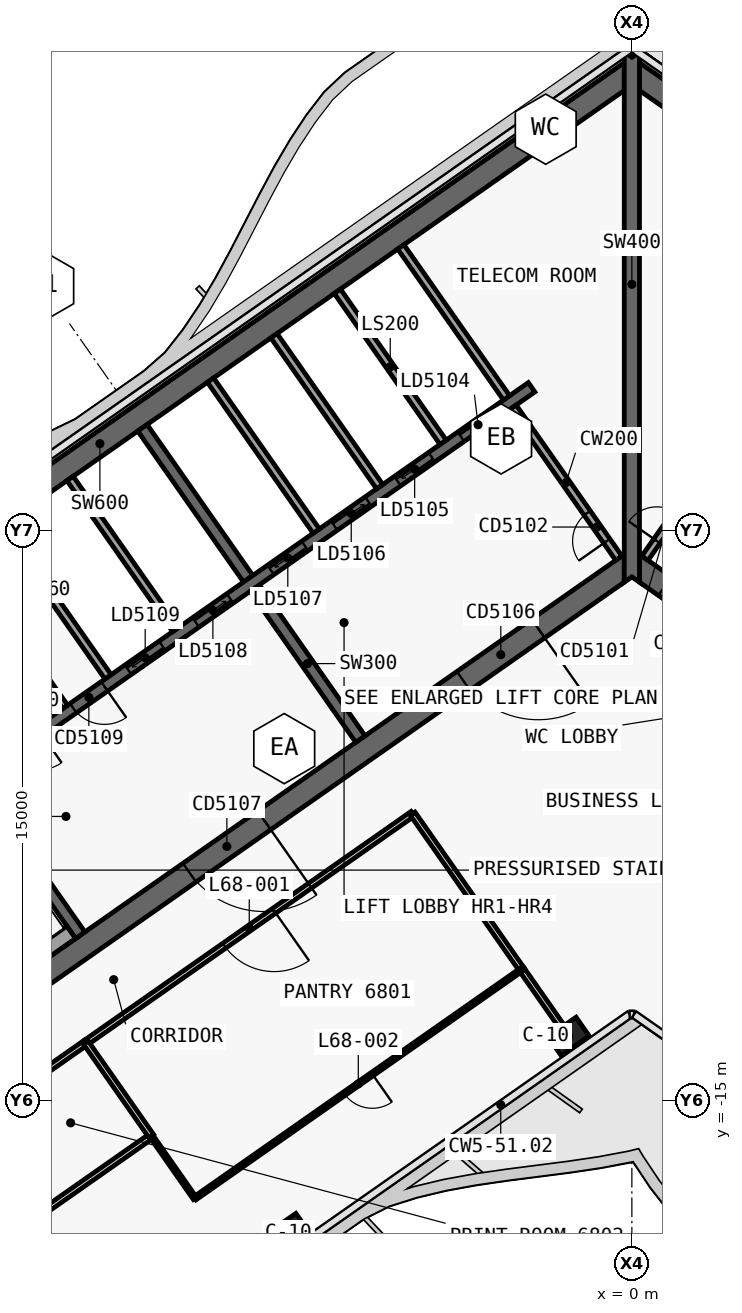
"""IFC4 building model, lengths in metres.
Left out: names, types, materials, properties, quantities, classifications, styles, units other than length and angle.
Written with IfcOpenShell. Run it as: python <this file> out.ifc"""

import sys

from ifc_helpers import new_model, si_unit, direction, frame, frame_2d, origin, origin_2d, place, context, subcontext, project, spatial, polyline, rectangle, outline, extrude, element, fill, save


model = new_model("IFC4")
c1 = context("Model", 3, precision=1e-05, world=origin(), true_north=direction((0.0, 1.0)))
c2 = subcontext(c1, "Body", "Model", "MODEL_VIEW")
j1 = project(units=[si_unit("LENGTHUNIT", "METRE"), si_unit("PLANEANGLEUNIT", "RADIAN")], contexts=[c1])
p1 = place(None, origin())
s1 = spatial("IfcSite", under=j1, at=p1, CompositionType="ELEMENT")
p2 = place(p1, origin())
s2 = spatial("IfcBuilding", under=s1, at=p2, CompositionType="ELEMENT")
p3 = place(p2, frame((0.0, 0.0, 287.8)))
s3 = spatial("IfcBuildingStorey", under=s2, at=p3, CompositionType="ELEMENT", Elevation=287.8)
p4 = place(p3, frame((-0.028, 12.066, 0.0), z_axis=(0.0, 0.0, 1.0), x_axis=(-0.819151382952, -0.573577380837, 0.0)))
e1 = element("IfcWall", 1, at=p4, inside=s3, PredefinedType="SHEAR", context=c2, shape_type="SweptSolid", body=[
    extrude(outline(polyline([(33.898, 0.3), (0.42, 0.3), (0.0, -0.3), (33.898, -0.3), (33.898, 0.3)])), origin(), (0.0, 0.0, 1.0), 3.9),
])
p5 = place(p3, frame((-0.028, -0.874, 0.0), z_axis=(0.0, 0.0, 1.0), x_axis=(-0.819150035022, -0.573579305871, 0.0)))
e2 = element("IfcWall", 2, at=p5, inside=s3, PredefinedType="SHEAR", context=c2, shape_type="SweptSolid", body=[
    extrude(outline(polyline([(26.476, 0.3), (0.42, 0.3), (0.0, -0.3), (26.476, -0.3), (26.476, 0.3)])), origin(), (0.0, 0.0, 1.0), 3.9),
])
p6 = place(p5, frame((2.976, 0.0, 0.0)))
e3 = element("IfcOpeningElement", 3, at=p6, cuts=e2, PredefinedType="OPENING", context=c2, shape_type="SweptSolid", body=[
    extrude(rectangle(XDim=2.4, YDim=2.1, at=frame_2d((1.2, 1.05))), frame((0.0, 0.31, 0.0), z_axis=(0.0, -1.0, 0.0), x_axis=(1.0, 0.0, 0.0)), (0.0, 0.0, 1.0), 0.62),
])
p7 = place(p5, frame((11.776, 0.0, 0.0)))
e4 = element("IfcOpeningElement", 4, at=p7, cuts=e2, PredefinedType="OPENING", context=c2, shape_type="SweptSolid", body=[
    extrude(rectangle(XDim=2.4, YDim=2.1, at=frame_2d((1.2, 1.05))), frame((0.0, 0.31, 0.0), z_axis=(0.0, -1.0, 0.0), x_axis=(1.0, 0.0, 0.0)), (0.0, 0.0, 1.0), 0.62),
])
p8 = place(p3, frame((-7.143, -5.49, 0.0), z_axis=(0.0, 0.0, 1.0), x_axis=(-0.573617744349, 0.819123118565, 0.0)))
e5 = element("IfcWall", 5, at=p8, inside=s3, PredefinedType="SHEAR", context=c2, shape_type="SweptSolid", body=[
    extrude(outline(polyline([(4.85, 0.15), (0.0, 0.15), (0.0, -0.15), (4.85, -0.15), (4.85, 0.15)])), origin(), (0.0, 0.0, 1.0), 3.9),
])
p9 = place(p3, frame((-10.097, -1.271, 0.0), z_axis=(0.0, 0.0, 1.0), x_axis=(-0.573560315113, 0.819163332265, 0.0)))
e6 = element("IfcWall", 6, at=p9, inside=s3, PredefinedType="SHEAR", context=c2, shape_type="SweptSolid", body=[
    extrude(outline(polyline([(4.85, -0.15), (4.85, 0.15), (0.0, 0.15), (0.0, -0.15), (4.85, -0.15)])), origin(), (0.0, 0.0, 1.0), 3.9),
])
p10 = place(p3, frame((-14.515, -10.652, 0.0), z_axis=(0.0, 0.0, 1.0), x_axis=(-0.573560315113, 0.819163332265, 0.0)))
e7 = element("IfcWall", 7, at=p10, inside=s3, PredefinedType="SHEAR", context=c2, shape_type="SweptSolid", body=[
    extrude(outline(polyline([(4.85, 0.15), (0.0, 0.15), (0.0, -0.15), (4.85, -0.15), (4.85, 0.15)])), origin(), (0.0, 0.0, 1.0), 3.9),
])
p11 = place(p3, frame((-2.638, 3.768, 0.0), z_axis=(0.0, 0.0, 1.0), x_axis=(-0.819155014212, -0.573572194837, 0.0)))
e8 = element("IfcWall", 8, at=p11, inside=s3, PredefinedType="SHEAR", context=c2, shape_type="SweptSolid", body=[
    extrude(outline(polyline([(26.4, 0.15), (0.0, 0.15), (0.0, -0.15), (26.4, -0.15), (26.4, 0.15)])), origin(), (0.0, 0.0, 1.0), 3.9),
])
p12 = place(p11, frame((1.169, 0.0, 0.0)))
e9 = element("IfcOpeningElement", 9, at=p12, cuts=e8, PredefinedType="OPENING", context=c2, shape_type="SweptSolid", body=[
    extrude(rectangle(XDim=1.1, YDim=2.1, at=frame_2d((0.55, 1.05))), frame((0.0, 0.16, 0.0), z_axis=(0.0, -1.0, 0.0), x_axis=(1.0, 0.0, 0.0)), (0.0, 0.0, 1.0), 0.32),
])
p13 = place(p11, frame((3.206, 0.0, 0.0)))
e10 = element("IfcOpeningElement", 10, at=p13, cuts=e8, PredefinedType="OPENING", context=c2, shape_type="SweptSolid", body=[
    extrude(rectangle(XDim=1.1, YDim=2.1, at=frame_2d((0.55, 1.05))), frame((0.0, 0.16, 0.0), z_axis=(0.0, -1.0, 0.0), x_axis=(1.0, 0.0, 0.0)), (0.0, 0.0, 1.0), 0.32),
])
p14 = place(p11, frame((5.244, 0.0, 0.0)))
e11 = element("IfcOpeningElement", 11, at=p14, cuts=e8, PredefinedType="OPENING", context=c2, shape_type="SweptSolid", body=[
    extrude(rectangle(XDim=1.1, YDim=2.1, at=frame_2d((0.55, 1.05))), frame((0.0, 0.16, 0.0), z_axis=(0.0, -1.0, 0.0), x_axis=(1.0, 0.0, 0.0)), (0.0, 0.0, 1.0), 0.32),
])
p15 = place(p11, frame((7.281, 0.0, 0.0)))
e12 = element("IfcOpeningElement", 12, at=p15, cuts=e8, PredefinedType="OPENING", context=c2, shape_type="SweptSolid", body=[
    extrude(rectangle(XDim=1.1, YDim=2.1, at=frame_2d((0.55, 1.05))), frame((0.0, 0.16, 0.0), z_axis=(0.0, -1.0, 0.0), x_axis=(1.0, 0.0, 0.0)), (0.0, 0.0, 1.0), 0.32),
])
p16 = place(p11, frame((9.688, 0.0, 0.0)))
e13 = element("IfcOpeningElement", 13, at=p16, cuts=e8, PredefinedType="OPENING", context=c2, shape_type="SweptSolid", body=[
    extrude(rectangle(XDim=1.1, YDim=2.1, at=frame_2d((0.55, 1.05))), frame((0.0, 0.16, 0.0), z_axis=(0.0, -1.0, 0.0), x_axis=(1.0, 0.0, 0.0)), (0.0, 0.0, 1.0), 0.32),
])
p17 = place(p11, frame((11.863, 0.0, 0.0)))
e14 = element("IfcOpeningElement", 14, at=p17, cuts=e8, PredefinedType="OPENING", context=c2, shape_type="SweptSolid", body=[
    extrude(rectangle(XDim=1.1, YDim=2.1, at=frame_2d((0.55, 1.05))), frame((0.0, 0.16, 0.0), z_axis=(0.0, -1.0, 0.0), x_axis=(1.0, 0.0, 0.0)), (0.0, 0.0, 1.0), 0.32),
])
p18 = place(p11, frame((13.722, 0.0, 0.0)))
e15 = element("IfcOpeningElement", 15, at=p18, cuts=e8, PredefinedType="OPENING", context=c2, shape_type="SweptSolid", body=[
    extrude(rectangle(XDim=1.0, YDim=2.1, at=frame_2d((0.5, 1.05))), frame((0.0, 0.16, 0.0), z_axis=(0.0, -1.0, 0.0), x_axis=(1.0, 0.0, 0.0)), (0.0, 0.0, 1.0), 0.32),
])
p19 = place(p11, frame((15.798, 0.0, 0.0)))
e16 = element("IfcOpeningElement", 16, at=p19, cuts=e8, PredefinedType="OPENING", context=c2, shape_type="SweptSolid", body=[
    extrude(rectangle(XDim=1.0, YDim=2.1, at=frame_2d((0.5, 1.05))), frame((0.0, 0.16, 0.0), z_axis=(0.0, -1.0, 0.0), x_axis=(1.0, 0.0, 0.0)), (0.0, 0.0, 1.0), 0.32),
])
p20 = place(p3, frame((0.028, 12.066, 0.0), z_axis=(0.0, 0.0, 1.0), x_axis=(0.819151382952, -0.573577380837, 0.0)))
e17 = element("IfcWall", 17, at=p20, inside=s3, PredefinedType="SHEAR", context=c2, shape_type="SweptSolid", body=[
    extrude(outline(polyline([(33.898, 0.3), (0.0, 0.3), (0.42, -0.3), (33.898, -0.3), (33.898, 0.3)])), origin(), (0.0, 0.0, 1.0), 3.9),
])
p21 = place(p3, frame((0.028, -0.874, 0.0), z_axis=(0.0, 0.0, 1.0), x_axis=(0.819150035022, -0.573579305871, 0.0)))
e18 = element("IfcWall", 18, at=p21, inside=s3, PredefinedType="SHEAR", context=c2, shape_type="SweptSolid", body=[
    extrude(outline(polyline([(26.476, 0.3), (0.0, 0.3), (0.42, -0.3), (26.476, -0.3), (26.476, 0.3)])), origin(), (0.0, 0.0, 1.0), 3.9),
])
p22 = place(p21, frame((1.026, 0.0, 0.0)))
e19 = element("IfcOpeningElement", 19, at=p22, cuts=e18, PredefinedType="OPENING", context=c2, shape_type="SweptSolid", body=[
    extrude(rectangle(XDim=1.5, YDim=2.1, at=frame_2d((0.75, 1.05))), frame((0.0, 0.31, 0.0), z_axis=(0.0, -1.0, 0.0), x_axis=(1.0, 0.0, 0.0)), (0.0, 0.0, 1.0), 0.62),
])
p23 = place(p21, frame((12.226, 0.0, 0.0)))
e20 = element("IfcOpeningElement", 20, at=p23, cuts=e18, PredefinedType="OPENING", context=c2, shape_type="SweptSolid", body=[
    extrude(rectangle(XDim=1.5, YDim=2.1, at=frame_2d((0.75, 1.05))), frame((0.0, 0.31, 0.0), z_axis=(0.0, -1.0, 0.0), x_axis=(1.0, 0.0, 0.0)), (0.0, 0.0, 1.0), 0.62),
])
p24 = place(p3, frame((0.0, -1.361, 0.0), z_axis=(0.0, 0.0, 1.0), x_axis=(0.0, 1.0, 0.0)))
e21 = element("IfcWall", 21, at=p24, inside=s3, PredefinedType="SHEAR", context=c2, shape_type="SweptSolid", body=[
    extrude(outline(polyline([(0.14, 0.2), (0.0, 0.2), (0.14, 0.0), (0.0, -0.2), (0.14, -0.2), (1.012, -0.2), (12.94, -0.2), (13.813, -0.2), (13.893, -0.2), (13.933, -0.172), (13.813, 0.0), (13.933, 0.172), (13.893, 0.2), (13.813, 0.2), (12.94, 0.2), (1.012, 0.2), (0.14, 0.2)])), origin(), (0.0, 0.0, 1.0), 3.9),
])
for number, where, z_axis, x_axis in (
    (22, (-1.665, -13.313, 0.0), (0.0, 0.0, 1.0), (-0.819, -0.574, 0.0)),
    (23, (-9.038, -18.475, 0.0), (0.0, 0.0, 1.0), (-0.819, -0.574, 0.0)),
):
    element("IfcColumn", number, at=place(p3, frame(where, z_axis=z_axis, x_axis=x_axis)), inside=s3, PredefinedType="COLUMN", context=c2, shape_type="SweptSolid", body=[
        extrude(rectangle(XDim=0.9, YDim=0.6, at=origin_2d()), origin(), (0.0, 0.0, 1.0), 3.9),
    ])
p25 = place(p3, frame((-4.967, 2.321, 0.0), z_axis=(0.0, 0.0, 1.0), x_axis=(-0.573594092424, 0.81913968109, 0.0)))
e24 = element("IfcWall", 24, at=p25, inside=s3, PredefinedType="SOLIDWALL", context=c2, shape_type="SweptSolid", body=[
    extrude(rectangle(XDim=4.85, YDim=0.2, at=frame_2d((2.425, 0.0))), origin(), (0.0, 0.0, 1.0), 3.9),
])
p26 = place(p3, frame((-6.636, 1.152, 0.0), z_axis=(0.0, 0.0, 1.0), x_axis=(-0.573560315113, 0.819163332265, 0.0)))
e25 = element("IfcWall", 25, at=p26, inside=s3, PredefinedType="SOLIDWALL", context=c2, shape_type="SweptSolid", body=[
    extrude(rectangle(XDim=4.85, YDim=0.2, at=frame_2d((2.425, 0.0))), origin(), (0.0, 0.0, 1.0), 3.9),
])
p27 = place(p3, frame((-8.305, -0.017, 0.0), z_axis=(0.0, 0.0, 1.0), x_axis=(-0.573594092424, 0.81913968109, 0.0)))
e26 = element("IfcWall", 26, at=p27, inside=s3, PredefinedType="SOLIDWALL", context=c2, shape_type="SweptSolid", body=[
    extrude(rectangle(XDim=4.85, YDim=0.2, at=frame_2d((2.425, 0.0))), origin(), (0.0, 0.0, 1.0), 3.9),
])
p28 = place(p3, frame((-14.909, -4.641, 0.0), z_axis=(0.0, 0.0, 1.0), x_axis=(-0.573560315113, 0.819163332265, 0.0)))
e27 = element("IfcWall", 27, at=p28, inside=s3, PredefinedType="PARTITIONING", context=c2, shape_type="SweptSolid", body=[
    extrude(rectangle(XDim=4.85, YDim=0.15, at=frame_2d((2.425, 0.0))), origin(), (0.0, 0.0, 1.0), 3.62),
])
p29 = place(p3, frame((-12.001, -2.605, 0.0), z_axis=(0.0, 0.0, 1.0), x_axis=(-0.573560315113, 0.819163332265, 0.0)))
e28 = element("IfcWall", 28, at=p29, inside=s3, PredefinedType="SOLIDWALL", context=c2, shape_type="SweptSolid", body=[
    extrude(rectangle(XDim=4.85, YDim=0.2, at=frame_2d((2.425, 0.0))), origin(), (0.0, 0.0, 1.0), 3.9),
])
p30 = place(p3, frame((-13.783, -3.852, 0.0), z_axis=(0.0, 0.0, 1.0), x_axis=(-0.573594092424, 0.81913968109, 0.0)))
e29 = element("IfcWall", 29, at=p30, inside=s3, PredefinedType="SOLIDWALL", context=c2, shape_type="SweptSolid", body=[
    extrude(rectangle(XDim=4.85, YDim=0.2, at=frame_2d((2.425, 0.0))), origin(), (0.0, 0.0, 1.0), 3.9),
])
p31 = place(p3, frame((-14.753, -10.574, 0.0), z_axis=(0.0, 0.0, 1.0), x_axis=(-0.819158229677, -0.573567602601, 0.0)))
e30 = element("IfcWall", 30, at=p31, inside=s3, PredefinedType="SOLIDWALL", context=c2, shape_type="SweptSolid", body=[
    extrude(rectangle(XDim=8.25, YDim=0.4, at=frame_2d((4.125, 0.0))), origin(), (0.0, 0.0, 1.0), 3.62),
])
p32 = place(p3, frame((-0.344, -0.729, 0.0), z_axis=(0.0, 0.0, 1.0), x_axis=(-0.573560315113, 0.819163332265, 0.0)))
e31 = element("IfcWall", 31, at=p32, inside=s3, PredefinedType="SOLIDWALL", context=c2, shape_type="SweptSolid", body=[
    extrude(rectangle(XDim=4.85, YDim=0.2, at=frame_2d((2.425, 0.0))), origin(), (0.0, 0.0, 1.0), 3.62),
])
p33 = place(p32, frame((0.55, 0.0, 0.0)))
e32 = element("IfcOpeningElement", 32, at=p33, cuts=e31, PredefinedType="OPENING", context=c2, shape_type="SweptSolid", body=[
    extrude(rectangle(XDim=0.9, YDim=2.1, at=frame_2d((0.45, 1.05))), frame((0.0, 0.11, 0.0), z_axis=(0.0, -1.0, 0.0), x_axis=(1.0, 0.0, 0.0)), (0.0, 0.0, 1.0), 0.22),
])
p34 = place(p3, frame((-3.298, 3.49, 0.0), z_axis=(0.0, 0.0, 1.0), x_axis=(-0.573560315113, 0.819163332265, 0.0)))
e33 = element("IfcWall", 33, at=p34, inside=s3, PredefinedType="SOLIDWALL", context=c2, shape_type="SweptSolid", body=[
    extrude(rectangle(XDim=4.85, YDim=0.2, at=frame_2d((2.425, 0.0))), origin(), (0.0, 0.0, 1.0), 3.62),
])
p35 = place(p3, frame((0.344, -0.729, 0.0), z_axis=(0.0, 0.0, 1.0), x_axis=(0.573560315113, 0.819163332265, 0.0)))
e34 = element("IfcWall", 34, at=p35, inside=s3, PredefinedType="SOLIDWALL", context=c2, shape_type="SweptSolid", body=[
    extrude(rectangle(XDim=4.85, YDim=0.2, at=frame_2d((2.425, 0.0))), origin(), (0.0, 0.0, 1.0), 3.62),
])
p36 = place(p35, frame((0.55, 0.0, 0.0)))
e35 = element("IfcOpeningElement", 35, at=p36, cuts=e34, PredefinedType="OPENING", context=c2, shape_type="SweptSolid", body=[
    extrude(rectangle(XDim=0.9, YDim=2.1, at=frame_2d((0.45, 1.05))), frame((0.0, 0.11, 0.0), z_axis=(0.0, -1.0, 0.0), x_axis=(1.0, 0.0, 0.0)), (0.0, 0.0, 1.0), 0.22),
])
p37 = place(p3, frame((-5.766, -7.456, 0.0), z_axis=(0.0, 0.0, 1.0), x_axis=(-0.819154371039, -0.573573113393, 0.0)))
e36 = element("IfcWall", 36, at=p37, inside=s3, PredefinedType="PARTITIONING", context=c2, shape_type="SweptSolid", body=[
    extrude(rectangle(XDim=10.502, YDim=0.15, at=frame_2d((5.251, 0.0))), origin(), (0.0, 0.0, 1.0), 3.05),
])
p38 = place(p37, frame((4.451, 0.0, 0.0)))
e37 = element("IfcOpeningElement", 37, at=p38, cuts=e36, PredefinedType="OPENING", context=c2, shape_type="SweptSolid", body=[
    extrude(rectangle(XDim=1.6, YDim=2.1, at=frame_2d((0.8, 1.05))), frame((0.0, 0.085, 0.0), z_axis=(0.0, -1.0, 0.0), x_axis=(1.0, 0.0, 0.0)), (0.0, 0.0, 1.0), 0.17),
])
p39 = place(p3, frame((-14.366, -13.477, 0.0), z_axis=(0.0, 0.0, 1.0), x_axis=(-0.819164075089, -0.573559254204, 0.0)))
e38 = element("IfcWall", 38, at=p39, inside=s3, PredefinedType="PARTITIONING", context=c2, shape_type="SweptSolid", body=[
    extrude(rectangle(XDim=12.004, YDim=0.15, at=frame_2d((6.002, 0.0))), origin(), (0.0, 0.0, 1.0), 3.05),
])
p40 = place(p39, frame((5.202, 0.0, 0.0)))
e39 = element("IfcOpeningElement", 39, at=p40, cuts=e38, PredefinedType="OPENING", context=c2, shape_type="SweptSolid", body=[
    extrude(rectangle(XDim=1.6, YDim=2.1, at=frame_2d((0.8, 1.05))), frame((0.0, 0.085, 0.0), z_axis=(0.0, -1.0, 0.0), x_axis=(1.0, 0.0, 0.0)), (0.0, 0.0, 1.0), 0.17),
])
p41 = place(p3, frame((-1.849, -13.051, 0.0), z_axis=(0.0, 0.0, 1.0), x_axis=(-0.573542889209, 0.819175533227, 0.0)))
e40 = element("IfcWall", 40, at=p41, inside=s3, PredefinedType="PARTITIONING", context=c2, shape_type="SweptSolid", body=[
    extrude(rectangle(XDim=1.831, YDim=0.15, at=frame_2d((0.916, 0.0))), origin(), (0.0, 0.0, 1.0), 3.05),
])
p42 = place(p3, frame((-2.897, -11.553, 0.0), z_axis=(0.0, 0.0, 1.0), x_axis=(-0.573593309886, 0.819140229054, 0.0)))
e41 = element("IfcWall", 41, at=p42, inside=s3, PredefinedType="PARTITIONING", context=c2, shape_type="SweptSolid", body=[
    extrude(rectangle(XDim=5.004, YDim=0.15, at=frame_2d((2.502, 0.0))), origin(), (0.0, 0.0, 1.0), 3.05),
])
p43 = place(p3, frame((-11.499, -17.575, 0.0), z_axis=(0.0, 0.0, 1.0), x_axis=(-0.573486922046, 0.819214715592, 0.0)))
e42 = element("IfcWall", 42, at=p43, inside=s3, PredefinedType="PARTITIONING", context=c2, shape_type="SweptSolid", body=[
    extrude(rectangle(XDim=2.0, YDim=0.1, at=frame_2d((1.0, 0.0))), origin(), (0.0, 0.0, 1.0), 3.62),
])
p44 = place(p3, frame((-2.898, -11.552, 0.0), z_axis=(0.0, 0.0, 1.0), x_axis=(-0.819155448096, -0.573571575181, 0.0)))
e43 = element("IfcWall", 43, at=p44, inside=s3, PredefinedType="PARTITIONING", context=c2, shape_type="SweptSolid", body=[
    extrude(rectangle(XDim=10.5, YDim=0.1, at=frame_2d((5.25, 0.0))), origin(), (0.0, 0.0, 1.0), 3.05),
])
p45 = place(p44, frame((4.8, 0.0, 0.0)))
e44 = element("IfcOpeningElement", 44, at=p45, cuts=e43, PredefinedType="OPENING", context=c2, shape_type="SweptSolid", body=[
    extrude(rectangle(XDim=0.9, YDim=2.1, at=frame_2d((0.45, 1.05))), frame((0.0, 0.06, 0.0), z_axis=(0.0, -1.0, 0.0), x_axis=(1.0, 0.0, 0.0)), (0.0, 0.0, 1.0), 0.12),
])
p46 = place(p3, frame((-22.476, -22.82, 0.0), z_axis=(0.0, 0.0, 1.0), x_axis=(0.819153538506, 0.573574302382, 0.0)))
e45 = element("IfcWall", 45, at=p46, inside=s3, PredefinedType="PARTITIONING", context=c2, shape_type="SweptSolid", body=[
    extrude(rectangle(XDim=12.0, YDim=0.15, at=frame_2d((6.0, 0.0))), origin(), (0.0, 0.0, 1.0), 3.05),
])
p47 = place(p3, frame((-12.646, -15.938, 0.0), z_axis=(0.0, 0.0, 1.0), x_axis=(-0.573604249862, 0.819132568355, 0.0)))
e46 = element("IfcWall", 46, at=p47, inside=s3, PredefinedType="PARTITIONING", context=c2, shape_type="SweptSolid", body=[
    extrude(rectangle(XDim=3.002, YDim=0.15, at=frame_2d((1.501, 0.0))), origin(), (0.0, 0.0, 1.0), 3.62),
])
p48 = place(p12, origin())
e47 = element("IfcDoor", 47, at=p48, inside=s3, OperationType="SLIDING_TO_LEFT", PredefinedType="DOOR", context=c2, shape_type="SweptSolid", body=[
    extrude(rectangle(XDim=1.1, YDim=2.1, at=frame_2d((0.55, 1.05))), frame((0.0, 0.025, 0.0), z_axis=(0.0, -1.0, 0.0), x_axis=(1.0, 0.0, 0.0)), (0.0, 0.0, 1.0), 0.05),
])
fill(e9, e47)
p49 = place(p13, origin())
e48 = element("IfcDoor", 48, at=p49, inside=s3, OperationType="SLIDING_TO_RIGHT", PredefinedType="DOOR", context=c2, shape_type="SweptSolid", body=[
    extrude(rectangle(XDim=1.1, YDim=2.1, at=frame_2d((0.55, 1.05))), frame((0.0, 0.025, 0.0), z_axis=(0.0, -1.0, 0.0), x_axis=(1.0, 0.0, 0.0)), (0.0, 0.0, 1.0), 0.05),
])
fill(e10, e48)
p50 = place(p14, origin())
e49 = element("IfcDoor", 49, at=p50, inside=s3, OperationType="SLIDING_TO_LEFT", PredefinedType="DOOR", context=c2, shape_type="SweptSolid", body=[
    extrude(rectangle(XDim=1.1, YDim=2.1, at=frame_2d((0.55, 1.05))), frame((0.0, 0.025, 0.0), z_axis=(0.0, -1.0, 0.0), x_axis=(1.0, 0.0, 0.0)), (0.0, 0.0, 1.0), 0.05),
])
fill(e11, e49)
p51 = place(p15, origin())
e50 = element("IfcDoor", 50, at=p51, inside=s3, OperationType="SLIDING_TO_RIGHT", PredefinedType="DOOR", context=c2, shape_type="SweptSolid", body=[
    extrude(rectangle(XDim=1.1, YDim=2.1, at=frame_2d((0.55, 1.05))), frame((0.0, 0.025, 0.0), z_axis=(0.0, -1.0, 0.0), x_axis=(1.0, 0.0, 0.0)), (0.0, 0.0, 1.0), 0.05),
])
fill(e12, e50)
p52 = place(p16, origin())
e51 = element("IfcDoor", 51, at=p52, inside=s3, OperationType="SLIDING_TO_LEFT", PredefinedType="DOOR", context=c2, shape_type="SweptSolid", body=[
    extrude(rectangle(XDim=1.1, YDim=2.1, at=frame_2d((0.55, 1.05))), frame((0.0, 0.025, 0.0), z_axis=(0.0, -1.0, 0.0), x_axis=(1.0, 0.0, 0.0)), (0.0, 0.0, 1.0), 0.05),
])
fill(e13, e51)
p53 = place(p17, origin())
e52 = element("IfcDoor", 52, at=p53, inside=s3, OperationType="SLIDING_TO_RIGHT", PredefinedType="DOOR", context=c2, shape_type="SweptSolid", body=[
    extrude(rectangle(XDim=1.1, YDim=2.1, at=frame_2d((0.55, 1.05))), frame((0.0, 0.025, 0.0), z_axis=(0.0, -1.0, 0.0), x_axis=(1.0, 0.0, 0.0)), (0.0, 0.0, 1.0), 0.05),
])
fill(e14, e52)
p54 = place(p18, origin())
e53 = element("IfcDoor", 53, at=p54, inside=s3, OperationType="SINGLE_SWING_RIGHT", PredefinedType="DOOR", context=c2, shape_type="SweptSolid", body=[
    extrude(rectangle(XDim=1.0, YDim=2.1, at=frame_2d((0.5, 1.05))), frame((0.0, 0.025, 0.0), z_axis=(0.0, -1.0, 0.0), x_axis=(1.0, 0.0, 0.0)), (0.0, 0.0, 1.0), 0.05),
])
fill(e15, e53)
p55 = place(p6, origin())
e54 = element("IfcDoor", 54, at=p55, inside=s3, OperationType="DOUBLE_DOOR_SINGLE_SWING", PredefinedType="DOOR", context=c2, shape_type="SweptSolid", body=[
    extrude(rectangle(XDim=2.4, YDim=2.1, at=frame_2d((1.2, 1.05))), frame((0.0, 0.025, 0.0), z_axis=(0.0, -1.0, 0.0), x_axis=(1.0, 0.0, 0.0)), (0.0, 0.0, 1.0), 0.05),
])
fill(e3, e54)
p56 = place(p7, origin())
e55 = element("IfcDoor", 55, at=p56, inside=s3, OperationType="DOUBLE_DOOR_SINGLE_SWING", PredefinedType="DOOR", context=c2, shape_type="SweptSolid", body=[
    extrude(rectangle(XDim=2.4, YDim=2.1, at=frame_2d((1.2, 1.05))), frame((0.0, 0.025, 0.0), z_axis=(0.0, -1.0, 0.0), x_axis=(1.0, 0.0, 0.0)), (0.0, 0.0, 1.0), 0.05),
])
fill(e4, e55)
p57 = place(p33, origin())
e56 = element("IfcDoor", 56, at=p57, inside=s3, OperationType="SINGLE_SWING_RIGHT", PredefinedType="DOOR", context=c2, shape_type="SweptSolid", body=[
    extrude(rectangle(XDim=0.9, YDim=2.1, at=frame_2d((0.45, 1.05))), frame((0.0, 0.025, 0.0), z_axis=(0.0, -1.0, 0.0), x_axis=(1.0, 0.0, 0.0)), (0.0, 0.0, 1.0), 0.05),
])
fill(e32, e56)
p58 = place(p36, origin())
e57 = element("IfcDoor", 57, at=p58, inside=s3, OperationType="SINGLE_SWING_RIGHT", PredefinedType="DOOR", context=c2, shape_type="SweptSolid", body=[
    extrude(rectangle(XDim=0.9, YDim=2.1, at=frame_2d((0.45, 1.05))), frame((0.0, 0.025, 0.0), z_axis=(0.0, -1.0, 0.0), x_axis=(1.0, 0.0, 0.0)), (0.0, 0.0, 1.0), 0.05),
])
fill(e35, e57)
p59 = place(p38, origin())
e58 = element("IfcDoor", 58, at=p59, inside=s3, OperationType="DOUBLE_DOOR_SINGLE_SWING", PredefinedType="DOOR", context=c2, shape_type="SweptSolid", body=[
    extrude(rectangle(XDim=1.6, YDim=2.1, at=frame_2d((0.8, 1.05))), frame((0.0, 0.025, 0.0), z_axis=(0.0, -1.0, 0.0), x_axis=(1.0, 0.0, 0.0)), (0.0, 0.0, 1.0), 0.05),
])
fill(e37, e58)
p60 = place(p45, origin())
e59 = element("IfcDoor", 59, at=p60, inside=s3, OperationType="SINGLE_SWING_LEFT", PredefinedType="DOOR", context=c2, shape_type="SweptSolid", body=[
    extrude(rectangle(XDim=0.9, YDim=2.1, at=frame_2d((0.45, 1.05))), frame((0.0, 0.025, 0.0), z_axis=(0.0, -1.0, 0.0), x_axis=(1.0, 0.0, 0.0)), (0.0, 0.0, 1.0), 0.05),
])
fill(e44, e59)
save(model, sys.argv[1])
